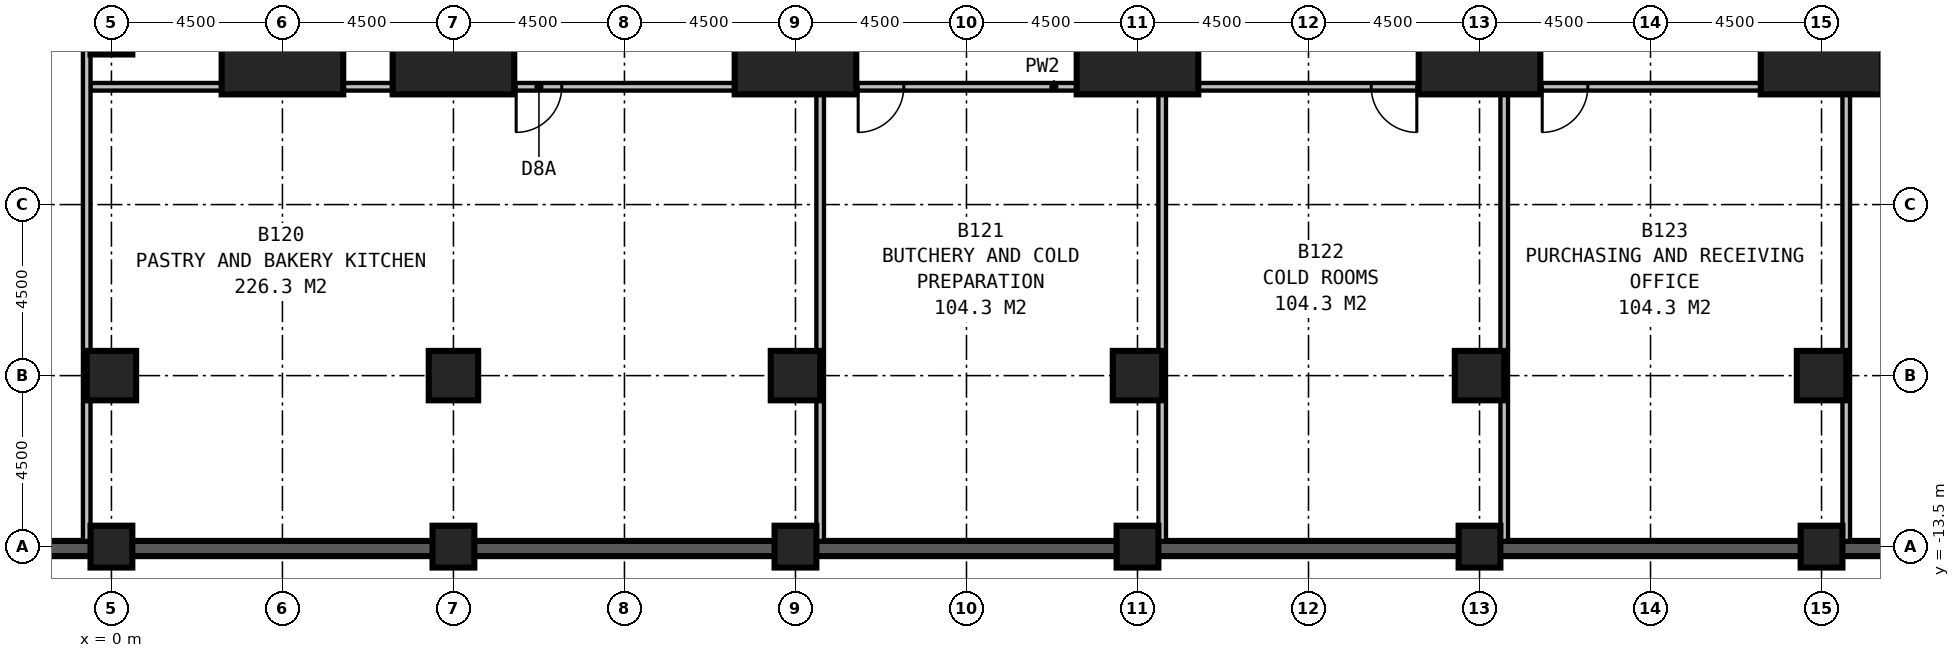
"""IFC4 building model, lengths in metres.
Left out: names, types, materials, properties, quantities, classifications, styles, units other than length and angle.
Written with IfcOpenShell. Run it as: python <this file> out.ifc"""

import sys

from ifc_helpers import new_model, si_unit, direction, frame, frame_2d, origin, origin_with_axes, origin_2d, place, context, subcontext, project, spatial, rectangle, extrude, element, fill, save


model = new_model("IFC4")
c1 = context("Model", 3, precision=1e-05, world=origin(), true_north=direction((0.0, 1.0)))
c2 = subcontext(c1, "Body", "Model", "MODEL_VIEW")
j1 = project(units=[si_unit("LENGTHUNIT", "METRE"), si_unit("PLANEANGLEUNIT", "RADIAN")], contexts=[c1])
p1 = place(None, origin())
s1 = spatial("IfcSite", under=j1, at=p1, CompositionType="ELEMENT")
p2 = place(p1, origin())
s2 = spatial("IfcBuilding", under=s1, at=p2, CompositionType="ELEMENT")
p3 = place(p2, frame((0.0, 0.0, -4.5)))
s3 = spatial("IfcBuildingStorey", under=s2, at=p3, CompositionType="ELEMENT", Elevation=-4.5)
for number, where, z_axis, x_axis in (
    (1, (4.5, 0.0, 0.0), (0.0, 0.0, 1.0), (1.0, 0.0, 0.0)),
    (2, (9.0, 0.0, 0.0), (0.0, 0.0, 1.0), (1.0, 0.0, 0.0)),
    (3, (18.0, 0.0, 0.0), (0.0, 0.0, 1.0), (1.0, 0.0, 0.0)),
    (4, (27.0, 0.0, 0.0), (0.0, 0.0, 1.0), (1.0, 0.0, 0.0)),
    (5, (36.0, 0.0, 0.0), (0.0, 0.0, 1.0), (1.0, 0.0, 0.0)),
    (6, (45.0, 0.0, 0.0), (0.0, 0.0, 1.0), (1.0, 0.0, 0.0)),
):
    element("IfcColumn", number, at=place(p3, frame(where, z_axis=z_axis, x_axis=x_axis)), inside=s3, PredefinedType="COLUMN", context=c2, shape_type="SweptSolid", body=[
        extrude(rectangle(XDim=3.2, YDim=3.2, at=origin_2d()), origin(), (0.0, 0.0, 1.0), 4.5),
    ])
for number, where, z_axis, x_axis in (
    (7, (0.0, -13.5, 0.0), (0.0, 0.0, 1.0), (1.0, 0.0, 0.0)),
    (8, (9.0, -13.5, 0.0), (0.0, 0.0, 1.0), (1.0, 0.0, 0.0)),
    (9, (18.0, -13.5, 0.0), (0.0, 0.0, 1.0), (1.0, 0.0, 0.0)),
    (10, (27.0, -13.5, 0.0), (0.0, 0.0, 1.0), (1.0, 0.0, 0.0)),
    (11, (36.0, -13.5, 0.0), (0.0, 0.0, 1.0), (1.0, 0.0, 0.0)),
    (12, (45.0, -13.5, 0.0), (0.0, 0.0, 1.0), (1.0, 0.0, 0.0)),
):
    element("IfcColumn", number, at=place(p3, frame(where, z_axis=z_axis, x_axis=x_axis)), inside=s3, PredefinedType="COLUMN", context=c2, shape_type="SweptSolid", body=[
        extrude(rectangle(XDim=1.1, YDim=1.1, at=origin_2d()), origin(), (0.0, 0.0, 1.0), 4.5),
    ])
for number, where, z_axis, x_axis in (
    (13, (0.0, -9.0, 0.0), (0.0, 0.0, 1.0), (1.0, 0.0, 0.0)),
    (14, (9.0, -9.0, 0.0), (0.0, 0.0, 1.0), (1.0, 0.0, 0.0)),
    (15, (18.0, -9.0, 0.0), (0.0, 0.0, 1.0), (1.0, 0.0, 0.0)),
    (16, (27.0, -9.0, 0.0), (0.0, 0.0, 1.0), (1.0, 0.0, 0.0)),
    (17, (36.0, -9.0, 0.0), (0.0, 0.0, 1.0), (1.0, 0.0, 0.0)),
    (18, (45.0, -9.0, 0.0), (0.0, 0.0, 1.0), (1.0, 0.0, 0.0)),
):
    element("IfcColumn", number, at=place(p3, frame(where, z_axis=z_axis, x_axis=x_axis)), inside=s3, PredefinedType="COLUMN", context=c2, shape_type="SweptSolid", body=[
        extrude(rectangle(XDim=1.3, YDim=1.3, at=origin_2d()), origin(), (0.0, 0.0, 1.0), 4.5),
    ])
p4 = place(p3, origin_with_axes())
e19 = element("IfcColumn", 19, at=p4, inside=s3, PredefinedType="COLUMN", context=c2, shape_type="SweptSolid", body=[
    extrude(rectangle(XDim=1.1, YDim=1.1, at=origin_2d()), origin(), (0.0, 0.0, 1.0), 4.5),
])
p5 = place(p3, frame((-18.25, -13.55, 0.0), z_axis=(0.0, 0.0, 1.0), x_axis=(1.0, 0.0, 0.0)))
e20 = element("IfcWall", 20, at=p5, inside=s3, PredefinedType="SOLIDWALL", context=c2, shape_type="SweptSolid", body=[
    extrude(rectangle(XDim=77.0, YDim=0.4, at=frame_2d((38.5, 0.0))), origin(), (0.0, 0.0, 1.0), 4.5),
])
p6 = place(p3, frame((-0.65, -13.35, 0.0), z_axis=(0.0, 0.0, 1.0), x_axis=(0.0, 1.0, 0.0)))
e21 = element("IfcWall", 21, at=p6, inside=s3, PredefinedType="PARTITIONING", context=c2, shape_type="SweptSolid", body=[
    extrude(rectangle(XDim=14.35, YDim=0.2, at=frame_2d((7.175, 0.0))), origin(), (0.0, 0.0, 1.0), 3.3),
])
for number, where, z_axis, x_axis in (
    (22, (18.65, -13.35, 0.0), (0.0, 0.0, 1.0), (0.0, 1.0, 0.0)),
    (23, (27.65, -13.35, 0.0), (0.0, 0.0, 1.0), (0.0, 1.0, 0.0)),
    (24, (36.65, -13.35, 0.0), (0.0, 0.0, 1.0), (0.0, 1.0, 0.0)),
    (25, (45.65, -13.35, 0.0), (0.0, 0.0, 1.0), (0.0, 1.0, 0.0)),
):
    element("IfcWall", number, at=place(p3, frame(where, z_axis=z_axis, x_axis=x_axis)), inside=s3, PredefinedType="PARTITIONING", context=c2, shape_type="SweptSolid", body=[
        extrude(rectangle(XDim=11.85, YDim=0.2, at=frame_2d((5.925, 0.0))), origin(), (0.0, 0.0, 1.0), 3.3),
    ])
p7 = place(p3, frame((-0.55, -1.4, 0.0), z_axis=(0.0, 0.0, 1.0), x_axis=(1.0, 0.0, 0.0)))
e26 = element("IfcWall", 26, at=p7, inside=s3, PredefinedType="PARTITIONING", context=c2, shape_type="SweptSolid", body=[
    extrude(rectangle(XDim=50.7, YDim=0.2, at=frame_2d((25.35, 0.0))), origin(), (0.0, 0.0, 1.0), 3.3),
])
p8 = place(p7, frame((12.4, 0.0, 0.0), z_axis=(0.0, 0.0, 1.0), x_axis=(-1.0, 0.0, 0.0)))
e27 = element("IfcOpeningElement", 27, at=p8, cuts=e26, PredefinedType="OPENING", context=c2, shape_type="SweptSolid", body=[
    extrude(rectangle(XDim=1.2, YDim=2.1, at=frame_2d((0.6, 1.05))), frame((0.0, 0.11, 0.0), z_axis=(0.0, -1.0, 0.0), x_axis=(1.0, 0.0, 0.0)), (0.0, 0.0, 1.0), 0.22),
])
p9 = place(p7, frame((21.4, 0.0, 0.0), z_axis=(0.0, 0.0, 1.0), x_axis=(-1.0, 0.0, 0.0)))
e28 = element("IfcOpeningElement", 28, at=p9, cuts=e26, PredefinedType="OPENING", context=c2, shape_type="SweptSolid", body=[
    extrude(rectangle(XDim=1.2, YDim=2.1, at=frame_2d((0.6, 1.05))), frame((0.0, 0.11, 0.0), z_axis=(0.0, -1.0, 0.0), x_axis=(1.0, 0.0, 0.0)), (0.0, 0.0, 1.0), 0.22),
])
p10 = place(p7, frame((34.9, 0.0, 0.0), z_axis=(0.0, 0.0, 1.0), x_axis=(-1.0, 0.0, 0.0)))
e29 = element("IfcOpeningElement", 29, at=p10, cuts=e26, PredefinedType="OPENING", context=c2, shape_type="SweptSolid", body=[
    extrude(rectangle(XDim=1.2, YDim=2.1, at=frame_2d((0.6, 1.05))), frame((0.0, 0.11, 0.0), z_axis=(0.0, -1.0, 0.0), x_axis=(1.0, 0.0, 0.0)), (0.0, 0.0, 1.0), 0.22),
])
p11 = place(p7, frame((39.4, 0.0, 0.0), z_axis=(0.0, 0.0, 1.0), x_axis=(-1.0, 0.0, 0.0)))
e30 = element("IfcOpeningElement", 30, at=p11, cuts=e26, PredefinedType="OPENING", context=c2, shape_type="SweptSolid", body=[
    extrude(rectangle(XDim=1.2, YDim=2.1, at=frame_2d((0.6, 1.05))), frame((0.0, 0.11, 0.0), z_axis=(0.0, -1.0, 0.0), x_axis=(1.0, 0.0, 0.0)), (0.0, 0.0, 1.0), 0.22),
])
p12 = place(p7, frame((48.85, 0.0, 0.0), z_axis=(0.0, 0.0, 1.0), x_axis=(-1.0, 0.0, 0.0)))
e31 = element("IfcOpeningElement", 31, at=p12, cuts=e26, PredefinedType="OPENING", context=c2, shape_type="SweptSolid", body=[
    extrude(rectangle(XDim=1.2, YDim=2.1, at=frame_2d((0.6, 1.05))), frame((0.0, 0.11, 0.0), z_axis=(0.0, -1.0, 0.0), x_axis=(1.0, 0.0, 0.0)), (0.0, 0.0, 1.0), 0.22),
])
p13 = place(p8, origin())
e32 = element("IfcDoor", 32, at=p13, inside=s3, OperationType="SINGLE_SWING_RIGHT", PredefinedType="DOOR", context=c2, shape_type="SweptSolid", body=[
    extrude(rectangle(XDim=1.2, YDim=2.1, at=frame_2d((0.6, 1.05))), frame((0.0, 0.025, 0.0), z_axis=(0.0, -1.0, 0.0), x_axis=(1.0, 0.0, 0.0)), (0.0, 0.0, 1.0), 0.05),
])
fill(e27, e32)
p14 = place(p9, origin())
e33 = element("IfcDoor", 33, at=p14, inside=s3, OperationType="SINGLE_SWING_RIGHT", PredefinedType="DOOR", context=c2, shape_type="SweptSolid", body=[
    extrude(rectangle(XDim=1.2, YDim=2.1, at=frame_2d((0.6, 1.05))), frame((0.0, 0.025, 0.0), z_axis=(0.0, -1.0, 0.0), x_axis=(1.0, 0.0, 0.0)), (0.0, 0.0, 1.0), 0.05),
])
fill(e28, e33)
p15 = place(p10, origin())
e34 = element("IfcDoor", 34, at=p15, inside=s3, OperationType="SINGLE_SWING_LEFT", PredefinedType="DOOR", context=c2, shape_type="SweptSolid", body=[
    extrude(rectangle(XDim=1.2, YDim=2.1, at=frame_2d((0.6, 1.05))), frame((0.0, 0.025, 0.0), z_axis=(0.0, -1.0, 0.0), x_axis=(1.0, 0.0, 0.0)), (0.0, 0.0, 1.0), 0.05),
])
fill(e29, e34)
p16 = place(p11, origin())
e35 = element("IfcDoor", 35, at=p16, inside=s3, OperationType="SINGLE_SWING_RIGHT", PredefinedType="DOOR", context=c2, shape_type="SweptSolid", body=[
    extrude(rectangle(XDim=1.2, YDim=2.1, at=frame_2d((0.6, 1.05))), frame((0.0, 0.025, 0.0), z_axis=(0.0, -1.0, 0.0), x_axis=(1.0, 0.0, 0.0)), (0.0, 0.0, 1.0), 0.05),
])
fill(e30, e35)
save(model, sys.argv[1])
